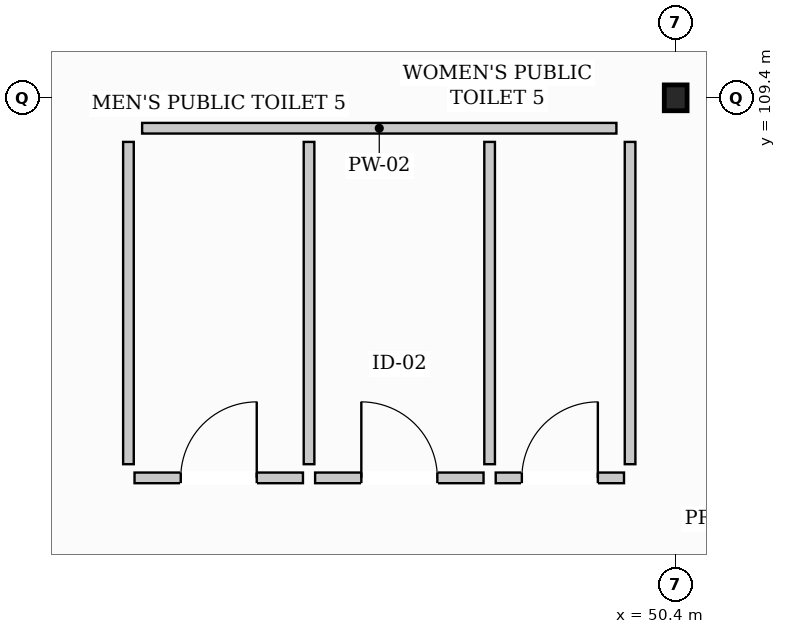
"""IFC4 building model, lengths in metres.
Left out: names, types, materials, properties, quantities, classifications, styles, units other than length and angle.
Written with IfcOpenShell. Run it as: python <this file> out.ifc"""

import sys

from ifc_helpers import new_model, si_unit, direction, frame, frame_2d, origin, origin_2d, place, context, subcontext, project, spatial, rectangle, i_section, extrude, element, fill, save


model = new_model("IFC4")
c1 = context("Model", 3, precision=1e-05, world=origin(), true_north=direction((0.0, 1.0)))
c2 = subcontext(c1, "Body", "Model", "MODEL_VIEW")
j1 = project(units=[si_unit("LENGTHUNIT", "METRE"), si_unit("PLANEANGLEUNIT", "RADIAN")], contexts=[c1])
p1 = place(None, origin())
s1 = spatial("IfcSite", under=j1, at=p1, CompositionType="ELEMENT")
p2 = place(p1, origin())
s2 = spatial("IfcBuilding", under=s1, at=p2, CompositionType="ELEMENT")
p3 = place(p2, frame((0.0, 0.0, 16.8)))
s3 = spatial("IfcBuildingStorey", under=s2, at=p3, CompositionType="ELEMENT", Elevation=16.8)
p4 = place(p3, frame((50.4, 109.4, 0.0), z_axis=(0.0, 0.0, 1.0), x_axis=(1.0, 0.0, 0.0)))
e1 = element("IfcColumn", 1, at=p4, inside=s3, PredefinedType="COLUMN", context=c2, shape_type="SweptSolid", body=[
    extrude(i_section(OverallWidth=0.3, OverallDepth=0.34, WebThickness=0.012, FlangeThickness=0.021, FilletRadius=0.027, at=origin_2d()), origin(), (0.0, 0.0, 1.0), 3.6),
])
p5 = place(p3, frame((43.38, 109.0, 0.0), z_axis=(0.0, 0.0, 1.0), x_axis=(1.0, 0.0, 0.0)))
e2 = element("IfcWall", 2, at=p5, inside=s3, PredefinedType="PARTITIONING", context=c2, shape_type="SweptSolid", body=[
    extrude(rectangle(XDim=6.24, YDim=0.14, at=frame_2d((3.12, 0.0))), origin(), (0.0, 0.0, 1.0), 3.42),
])
for number, where, z_axis, x_axis in (
    (3, (43.2, 104.58, 0.0), (0.0, 0.0, 1.0), (0.0, 1.0, 0.0)),
    (4, (49.8, 104.58, 0.0), (0.0, 0.0, 1.0), (0.0, 1.0, 0.0)),
    (5, (45.576, 104.58, 0.0), (0.0, 0.0, 1.0), (0.0, 1.0, 0.0)),
    (6, (47.952, 104.58, 0.0), (0.0, 0.0, 1.0), (0.0, 1.0, 0.0)),
):
    element("IfcWall", number, at=place(p3, frame(where, z_axis=z_axis, x_axis=x_axis)), inside=s3, PredefinedType="PARTITIONING", context=c2, shape_type="SweptSolid", body=[
        extrude(rectangle(XDim=4.24, YDim=0.14, at=frame_2d((2.12, 0.0))), origin(), (0.0, 0.0, 1.0), 3.42),
    ])
p6 = place(p3, frame((43.28, 104.4, 0.0), z_axis=(0.0, 0.0, 1.0), x_axis=(1.0, 0.0, 0.0)))
e7 = element("IfcWall", 7, at=p6, inside=s3, PredefinedType="PARTITIONING", context=c2, shape_type="SweptSolid", body=[
    extrude(rectangle(XDim=2.216, YDim=0.14, at=frame_2d((1.108, 0.0))), origin(), (0.0, 0.0, 1.0), 3.42),
])
p7 = place(p6, frame((0.608, 0.0, 0.0)))
e8 = element("IfcOpeningElement", 8, at=p7, cuts=e7, PredefinedType="OPENING", context=c2, shape_type="SweptSolid", body=[
    extrude(rectangle(XDim=1.0, YDim=2.15, at=frame_2d((0.5, 1.075))), frame((0.0, 0.08, 0.0), z_axis=(0.0, -1.0, 0.0), x_axis=(1.0, 0.0, 0.0)), (0.0, 0.0, 1.0), 0.16),
])
p8 = place(p3, frame((45.656, 104.4, 0.0), z_axis=(0.0, 0.0, 1.0), x_axis=(1.0, 0.0, 0.0)))
e9 = element("IfcWall", 9, at=p8, inside=s3, PredefinedType="PARTITIONING", context=c2, shape_type="SweptSolid", body=[
    extrude(rectangle(XDim=2.216, YDim=0.14, at=frame_2d((1.108, 0.0))), origin(), (0.0, 0.0, 1.0), 3.42),
])
p9 = place(p8, frame((0.608, 0.0, 0.0)))
e10 = element("IfcOpeningElement", 10, at=p9, cuts=e9, PredefinedType="OPENING", context=c2, shape_type="SweptSolid", body=[
    extrude(rectangle(XDim=1.0, YDim=2.15, at=frame_2d((0.5, 1.075))), frame((0.0, 0.08, 0.0), z_axis=(0.0, -1.0, 0.0), x_axis=(1.0, 0.0, 0.0)), (0.0, 0.0, 1.0), 0.16),
])
p10 = place(p3, frame((48.032, 104.4, 0.0), z_axis=(0.0, 0.0, 1.0), x_axis=(1.0, 0.0, 0.0)))
e11 = element("IfcWall", 11, at=p10, inside=s3, PredefinedType="PARTITIONING", context=c2, shape_type="SweptSolid", body=[
    extrude(rectangle(XDim=1.688, YDim=0.14, at=frame_2d((0.844, 0.0))), origin(), (0.0, 0.0, 1.0), 3.42),
])
p11 = place(p10, frame((0.344, 0.0, 0.0)))
e12 = element("IfcOpeningElement", 12, at=p11, cuts=e11, PredefinedType="OPENING", context=c2, shape_type="SweptSolid", body=[
    extrude(rectangle(XDim=1.0, YDim=2.15, at=frame_2d((0.5, 1.075))), frame((0.0, 0.08, 0.0), z_axis=(0.0, -1.0, 0.0), x_axis=(1.0, 0.0, 0.0)), (0.0, 0.0, 1.0), 0.16),
])
p12 = place(p7, origin())
e13 = element("IfcDoor", 13, at=p12, inside=s3, OperationType="SINGLE_SWING_RIGHT", PredefinedType="DOOR", context=c2, shape_type="SweptSolid", body=[
    extrude(rectangle(XDim=1.0, YDim=2.15, at=frame_2d((0.5, 1.075))), frame((0.0, 0.025, 0.0), z_axis=(0.0, -1.0, 0.0), x_axis=(1.0, 0.0, 0.0)), (0.0, 0.0, 1.0), 0.05),
])
fill(e8, e13)
p13 = place(p9, origin())
e14 = element("IfcDoor", 14, at=p13, inside=s3, OperationType="SINGLE_SWING_LEFT", PredefinedType="DOOR", context=c2, shape_type="SweptSolid", body=[
    extrude(rectangle(XDim=1.0, YDim=2.15, at=frame_2d((0.5, 1.075))), frame((0.0, 0.025, 0.0), z_axis=(0.0, -1.0, 0.0), x_axis=(1.0, 0.0, 0.0)), (0.0, 0.0, 1.0), 0.05),
])
fill(e10, e14)
p14 = place(p11, origin())
e15 = element("IfcDoor", 15, at=p14, inside=s3, OperationType="SINGLE_SWING_RIGHT", PredefinedType="DOOR", context=c2, shape_type="SweptSolid", body=[
    extrude(rectangle(XDim=1.0, YDim=2.15, at=frame_2d((0.5, 1.075))), frame((0.0, 0.025, 0.0), z_axis=(0.0, -1.0, 0.0), x_axis=(1.0, 0.0, 0.0)), (0.0, 0.0, 1.0), 0.05),
])
fill(e12, e15)
save(model, sys.argv[1])
